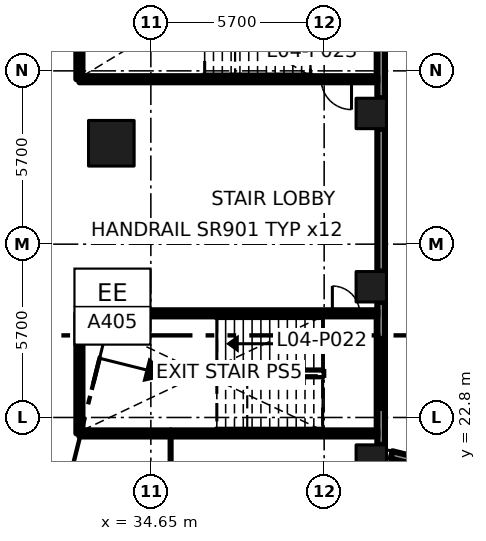
"""IFC4 building model, lengths in metres.
Left out: names, types, materials, properties, quantities, classifications, styles, units other than length and angle.
Written with IfcOpenShell. Run it as: python <this file> out.ifc"""

import sys

from ifc_helpers import new_model, si_unit, direction, frame, frame_2d, origin, origin_2d, place, context, subcontext, project, spatial, rectangle, extrude, element, fill, save


model = new_model("IFC4")
c1 = context("Model", 3, precision=1e-05, world=origin(), true_north=direction((0.0, 1.0)))
c2 = subcontext(c1, "Body", "Model", "MODEL_VIEW")
j1 = project(units=[si_unit("LENGTHUNIT", "METRE"), si_unit("PLANEANGLEUNIT", "RADIAN")], contexts=[c1])
p1 = place(None, origin())
s1 = spatial("IfcSite", under=j1, at=p1, CompositionType="ELEMENT")
p2 = place(p1, origin())
s2 = spatial("IfcBuilding", under=s1, at=p2, CompositionType="ELEMENT")
p3 = place(p2, frame((0.0, 0.0, 23.4)))
s3 = spatial("IfcBuildingStorey", under=s2, at=p3, CompositionType="ELEMENT", Elevation=23.4)
for number, where, z_axis, x_axis in (
    (1, (33.35, 26.119, 0.0), (0.0, 0.0, 1.0), (1.0, 0.0, 0.0)),
    (2, (33.35, 31.819, 0.0), (0.0, 0.0, 1.0), (1.0, 0.0, 0.0)),
):
    element("IfcColumn", number, at=place(p3, frame(where, z_axis=z_axis, x_axis=x_axis)), inside=s3, PredefinedType="COLUMN", context=c2, shape_type="SweptSolid", body=[
        extrude(rectangle(XDim=1.5, YDim=1.5, at=origin_2d()), origin(), (0.0, 0.0, 1.0), 4.8),
    ])
for number, where, z_axis, x_axis in (
    (3, (41.9, 21.399, 0.0), (0.0, 0.0, 1.0), (1.0, 0.0, 0.0)),
    (4, (41.9, 27.099, 0.0), (0.0, 0.0, 1.0), (1.0, 0.0, 0.0)),
    (5, (41.9, 32.799, 0.0), (0.0, 0.0, 1.0), (1.0, 0.0, 0.0)),
):
    element("IfcColumn", number, at=place(p3, frame(where, z_axis=z_axis, x_axis=x_axis)), inside=s3, PredefinedType="COLUMN", context=c2, shape_type="SweptSolid", body=[
        extrude(rectangle(XDim=1.0, YDim=1.0, at=origin_2d()), origin(), (0.0, 0.0, 1.0), 4.8),
    ])
p4 = place(p3, frame((32.3, 22.275, 0.0), z_axis=(0.0, 0.0, 1.0), x_axis=(0.0, 1.0, 0.0)))
e6 = element("IfcWall", 6, at=p4, inside=s3, PredefinedType="SOLIDWALL", context=c2, shape_type="SweptSolid", body=[
    extrude(rectangle(XDim=3.95, YDim=0.2, at=frame_2d((1.975, 0.0))), origin(), (0.0, 0.0, 1.0), 4.35),
])
p5 = place(p3, frame((32.3, 33.925, 0.0), z_axis=(0.0, 0.0, 1.0), x_axis=(0.0, 1.0, 0.0)))
e7 = element("IfcWall", 7, at=p5, inside=s3, PredefinedType="SOLIDWALL", context=c2, shape_type="SweptSolid", body=[
    extrude(rectangle(XDim=4.75, YDim=0.2, at=frame_2d((2.375, 0.0))), origin(), (0.0, 0.0, 1.0), 4.35),
])
p6 = place(p3, frame((34.12, 26.225, 0.0), z_axis=(0.0, 0.0, 1.0), x_axis=(1.0, 0.0, 0.0)))
e8 = element("IfcWall", 8, at=p6, inside=s3, PredefinedType="SOLIDWALL", context=c2, shape_type="SweptSolid", body=[
    extrude(rectangle(XDim=7.98, YDim=0.2, at=frame_2d((3.99, 0.0))), origin(), (0.0, 0.0, 1.0), 4.35),
])
p7 = place(p6, frame((6.5, 0.0, 0.0)))
e9 = element("IfcOpeningElement", 9, at=p7, cuts=e8, PredefinedType="OPENING", context=c2, shape_type="SweptSolid", body=[
    extrude(rectangle(XDim=0.9, YDim=2.1, at=frame_2d((0.45, 1.05))), frame((0.0, 0.11, 0.0), z_axis=(0.0, -1.0, 0.0), x_axis=(1.0, 0.0, 0.0)), (0.0, 0.0, 1.0), 0.22),
])
p8 = place(p3, frame((35.3, 9.6, 0.0), z_axis=(0.0, 0.0, 1.0), x_axis=(0.0, 1.0, 0.0)))
e10 = element("IfcWall", 10, at=p8, inside=s3, PredefinedType="PARTITIONING", context=c2, shape_type="SweptSolid", body=[
    extrude(rectangle(XDim=12.675, YDim=0.1, at=frame_2d((6.337, 0.0))), origin(), (0.0, 0.0, 1.0), 4.35),
])
p9 = place(p8, frame((7.98, 0.0, 0.0)))
e11 = element("IfcOpeningElement", 11, at=p9, cuts=e10, PredefinedType="OPENING", context=c2, shape_type="SweptSolid", body=[
    extrude(rectangle(XDim=1.0, YDim=2.1, at=frame_2d((0.5, 1.05))), frame((0.0, 0.06, 0.0), z_axis=(0.0, -1.0, 0.0), x_axis=(1.0, 0.0, 0.0)), (0.0, 0.0, 1.0), 0.12),
])
p10 = place(p3, frame((35.3, 22.275, 0.0), z_axis=(0.0, 0.0, 1.0), x_axis=(-1.0, 0.0, 0.0)))
e12 = element("IfcWall", 12, at=p10, inside=s3, PredefinedType="SOLIDWALL", context=c2, shape_type="SweptSolid", body=[
    extrude(rectangle(XDim=3.0, YDim=0.2, at=frame_2d((1.5, 0.0))), origin(), (0.0, 0.0, 1.0), 4.35),
])
p11 = place(p3, frame((42.1, 33.925, 0.0), z_axis=(0.0, 0.0, 1.0), x_axis=(-1.0, 0.0, 0.0)))
e13 = element("IfcWall", 13, at=p11, inside=s3, PredefinedType="SOLIDWALL", context=c2, shape_type="SweptSolid", body=[
    extrude(rectangle(XDim=9.8, YDim=0.2, at=frame_2d((4.9, 0.0))), origin(), (0.0, 0.0, 1.0), 4.35),
])
p12 = place(p11, frame((0.85, 0.0, 0.0)))
e14 = element("IfcOpeningElement", 14, at=p12, cuts=e13, PredefinedType="OPENING", context=c2, shape_type="SweptSolid", body=[
    extrude(rectangle(XDim=1.0, YDim=2.1, at=frame_2d((0.5, 1.05))), frame((0.0, 0.11, 0.0), z_axis=(0.0, -1.0, 0.0), x_axis=(1.0, 0.0, 0.0)), (0.0, 0.0, 1.0), 0.22),
])
p13 = place(p3, frame((35.3, 22.275, 0.0), z_axis=(0.0, 0.0, 1.0), x_axis=(1.0, 0.0, 0.0)))
e15 = element("IfcWall", 15, at=p13, inside=s3, PredefinedType="SOLIDWALL", context=c2, shape_type="SweptSolid", body=[
    extrude(rectangle(XDim=6.8, YDim=0.2, at=frame_2d((3.4, 0.0))), origin(), (0.0, 0.0, 1.0), 4.35),
])
p14 = place(p3, frame((46.922, 20.482, 0.0), z_axis=(0.0, 0.0, 1.0), x_axis=(-0.970279921141, 0.241985277715, 0.0)))
e16 = element("IfcWall", 16, at=p14, inside=s3, PredefinedType="SOLIDWALL", context=c2, shape_type="SweptSolid", body=[
    extrude(rectangle(XDim=4.489, YDim=0.25, at=frame_2d((2.244, 0.0))), origin(), (0.0, 0.0, 1.0), 3.45),
])
p15 = place(p14, frame((1.397, 0.0, 0.9)))
e17 = element("IfcOpeningElement", 17, at=p15, cuts=e16, PredefinedType="OPENING", context=c2, shape_type="SweptSolid", body=[
    extrude(rectangle(XDim=2.4, YDim=2.1, at=frame_2d((1.2, 1.05))), frame((0.0, 0.135, 0.0), z_axis=(0.0, -1.0, 0.0), x_axis=(1.0, 0.0, 0.0)), (0.0, 0.0, 1.0), 0.27),
])
p16 = place(p3, frame((42.225, 21.899, 0.0), z_axis=(0.0, 0.0, 1.0), x_axis=(0.0, 1.0, 0.0)))
e18 = element("IfcWall", 18, at=p16, inside=s3, PredefinedType="SOLIDWALL", context=c2, shape_type="SweptSolid", body=[
    extrude(rectangle(XDim=4.7, YDim=0.25, at=frame_2d((2.35, 0.0))), origin(), (0.0, 0.0, 1.0), 3.45),
])
p17 = place(p16, frame((1.15, 0.0, 0.9)))
e19 = element("IfcOpeningElement", 19, at=p17, cuts=e18, PredefinedType="OPENING", context=c2, shape_type="SweptSolid", body=[
    extrude(rectangle(XDim=2.4, YDim=2.1, at=frame_2d((1.2, 1.05))), frame((0.0, 0.135, 0.0), z_axis=(0.0, -1.0, 0.0), x_axis=(1.0, 0.0, 0.0)), (0.0, 0.0, 1.0), 0.27),
])
p18 = place(p3, frame((42.225, 27.599, 0.0), z_axis=(0.0, 0.0, 1.0), x_axis=(0.0, 1.0, 0.0)))
e20 = element("IfcWall", 20, at=p18, inside=s3, PredefinedType="SOLIDWALL", context=c2, shape_type="SweptSolid", body=[
    extrude(rectangle(XDim=4.7, YDim=0.25, at=frame_2d((2.35, 0.0))), origin(), (0.0, 0.0, 1.0), 3.45),
])
p19 = place(p3, frame((42.225, 33.299, 0.0), z_axis=(0.0, 0.0, 1.0), x_axis=(0.0, 1.0, 0.0)))
e21 = element("IfcWall", 21, at=p19, inside=s3, PredefinedType="SOLIDWALL", context=c2, shape_type="SweptSolid", body=[
    extrude(rectangle(XDim=6.037, YDim=0.25, at=frame_2d((3.019, 0.0))), origin(), (0.0, 0.0, 1.0), 3.45),
])
p20 = place(p19, frame((1.819, 0.0, 0.9)))
e22 = element("IfcOpeningElement", 22, at=p20, cuts=e21, PredefinedType="OPENING", context=c2, shape_type="SweptSolid", body=[
    extrude(rectangle(XDim=2.4, YDim=2.1, at=frame_2d((1.2, 1.05))), frame((0.0, 0.135, 0.0), z_axis=(0.0, -1.0, 0.0), x_axis=(1.0, 0.0, 0.0)), (0.0, 0.0, 1.0), 0.27),
])
p21 = place(p7, origin())
e23 = element("IfcDoor", 23, at=p21, inside=s3, OperationType="SINGLE_SWING_LEFT", PredefinedType="DOOR", context=c2, shape_type="SweptSolid", body=[
    extrude(rectangle(XDim=0.9, YDim=2.1, at=frame_2d((0.45, 1.05))), frame((0.0, 0.025, 0.0), z_axis=(0.0, -1.0, 0.0), x_axis=(1.0, 0.0, 0.0)), (0.0, 0.0, 1.0), 0.05),
])
fill(e9, e23)
p22 = place(p12, origin())
e24 = element("IfcDoor", 24, at=p22, inside=s3, OperationType="SINGLE_SWING_LEFT", PredefinedType="DOOR", context=c2, shape_type="SweptSolid", body=[
    extrude(rectangle(XDim=1.0, YDim=2.1, at=frame_2d((0.5, 1.05))), frame((0.0, 0.025, 0.0), z_axis=(0.0, -1.0, 0.0), x_axis=(1.0, 0.0, 0.0)), (0.0, 0.0, 1.0), 0.05),
])
fill(e14, e24)
p23 = place(p17, origin())
e25 = element("IfcWindow", 25, at=p23, inside=s3, PartitioningType="DOUBLE_PANEL_VERTICAL", PredefinedType="WINDOW", context=c2, shape_type="SweptSolid", body=[
    extrude(rectangle(XDim=2.4, YDim=2.1, at=frame_2d((1.2, 1.05))), frame((0.0, 0.03, 0.0), z_axis=(0.0, -1.0, 0.0), x_axis=(1.0, 0.0, 0.0)), (0.0, 0.0, 1.0), 0.06),
])
fill(e19, e25)
save(model, sys.argv[1])
